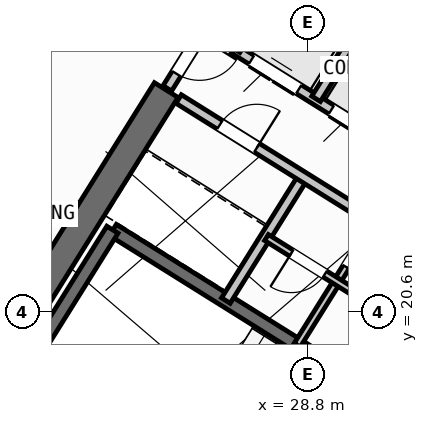
"""IFC4 building model, lengths in metres.
Left out: names, types, materials, properties, quantities, classifications, styles, units other than length and angle.
Written with IfcOpenShell. Run it as: python <this file> out.ifc"""

import sys

from ifc_helpers import new_model, si_unit, direction, frame, frame_2d, origin, place, context, subcontext, project, spatial, rectangle, extrude, source, transform, mapped, element, fill, save


model = new_model("IFC4")
c1 = context("Model", 3, precision=1e-05, world=origin(), true_north=direction((0.0, 1.0)))
c2 = subcontext(c1, "Body", "Model", "MODEL_VIEW")
j1 = project(units=[si_unit("LENGTHUNIT", "METRE"), si_unit("PLANEANGLEUNIT", "RADIAN")], contexts=[c1])
p1 = place(None, origin())
s1 = spatial("IfcSite", under=j1, at=p1, CompositionType="ELEMENT")
p2 = place(p1, origin())
s2 = spatial("IfcBuilding", under=s1, at=p2, CompositionType="ELEMENT")
p3 = place(p2, frame((0.0, 0.0, 132.6)))
s3 = spatial("IfcBuildingStorey", under=s2, at=p3, CompositionType="ELEMENT", Elevation=132.6)
p4 = place(p3, frame((40.573, 24.01, 0.0), z_axis=(0.0, 0.0, 1.0), x_axis=(-0.848047359947, 0.529920442413, 0.0)))
e1 = element("IfcWall", 1, at=p4, inside=s3, PredefinedType="SHEAR", context=c2, shape_type="SweptSolid", body=[
    extrude(rectangle(XDim=13.14, YDim=0.55, at=frame_2d((6.57, 0.0))), origin(), (0.0, 0.0, 1.0), 3.32),
])
p5 = place(p3, frame((26.007, 24.976, 0.0), z_axis=(0.0, 0.0, 1.0), x_axis=(-0.529923795287, -0.848045264823, 0.0)))
e2 = element("IfcWall", 2, at=p5, inside=s3, PredefinedType="SHEAR", context=c2, shape_type="SweptSolid", body=[
    extrude(rectangle(XDim=6.425, YDim=0.55, at=frame_2d((3.212, 0.0))), origin(), (0.0, 0.0, 1.0), 3.32),
])
p6 = place(p3, frame((29.268, 6.429, 0.0), z_axis=(0.0, 0.0, 1.0), x_axis=(-0.848049971435, 0.529916263149, 0.0)))
e3 = element("IfcWall", 3, at=p6, inside=s3, PredefinedType="STANDARD", context=c2, shape_type="SweptSolid", body=[
    extrude(rectangle(XDim=31.588, YDim=0.32, at=frame_2d((15.794, 0.0))), origin(), (0.0, 0.0, 1.0), 3.32),
])
p7 = place(p6, frame((16.362, 0.0, 0.0)))
e4 = element("IfcOpeningElement", 4, at=p7, cuts=e3, PredefinedType="OPENING", context=c2, shape_type="SweptSolid", body=[
    extrude(rectangle(XDim=1.2, YDim=2.15, at=frame_2d((0.6, 1.075))), frame((0.0, 0.17, 0.0), z_axis=(0.0, -1.0, 0.0), x_axis=(1.0, 0.0, 0.0)), (0.0, 0.0, 1.0), 0.34),
])
p8 = place(p6, frame((2.989, 0.0, 0.8)))
e5 = element("IfcOpeningElement", 5, at=p8, cuts=e3, PredefinedType="OPENING", context=c2, shape_type="SweptSolid", body=[
    extrude(rectangle(XDim=2.1, YDim=1.55, at=frame_2d((1.05, 0.775))), frame((0.0, 0.17, 0.0), z_axis=(0.0, -1.0, 0.0), x_axis=(1.0, 0.0, 0.0)), (0.0, 0.0, 1.0), 0.34),
])
p9 = place(p6, frame((8.359, 0.0, 0.8)))
e6 = element("IfcOpeningElement", 6, at=p9, cuts=e3, PredefinedType="OPENING", context=c2, shape_type="SweptSolid", body=[
    extrude(rectangle(XDim=2.1, YDim=1.55, at=frame_2d((1.05, 0.775))), frame((0.0, 0.17, 0.0), z_axis=(0.0, -1.0, 0.0), x_axis=(1.0, 0.0, 0.0)), (0.0, 0.0, 1.0), 0.34),
])
p10 = place(p6, frame((13.284, 0.0, 0.95)))
e7 = element("IfcOpeningElement", 7, at=p10, cuts=e3, PredefinedType="OPENING", context=c2, shape_type="SweptSolid", body=[
    extrude(rectangle(XDim=1.2, YDim=1.4, at=frame_2d((0.6, 0.7))), frame((0.0, 0.17, 0.0), z_axis=(0.0, -1.0, 0.0), x_axis=(1.0, 0.0, 0.0)), (0.0, 0.0, 1.0), 0.34),
])
p11 = place(p6, frame((20.39, 0.0, 0.95)))
e8 = element("IfcOpeningElement", 8, at=p11, cuts=e3, PredefinedType="OPENING", context=c2, shape_type="SweptSolid", body=[
    extrude(rectangle(XDim=1.2, YDim=1.4, at=frame_2d((0.6, 0.7))), frame((0.0, 0.17, 0.0), z_axis=(0.0, -1.0, 0.0), x_axis=(1.0, 0.0, 0.0)), (0.0, 0.0, 1.0), 0.34),
])
p12 = place(p6, frame((23.715, 0.0, 1.0)))
e9 = element("IfcOpeningElement", 9, at=p12, cuts=e3, PredefinedType="OPENING", context=c2, shape_type="SweptSolid", body=[
    extrude(rectangle(XDim=0.9, YDim=1.25, at=frame_2d((0.45, 0.625))), frame((0.0, 0.17, 0.0), z_axis=(0.0, -1.0, 0.0), x_axis=(1.0, 0.0, 0.0)), (0.0, 0.0, 1.0), 0.34),
])
p13 = place(p6, frame((27.481, 0.0, 0.8)))
e10 = element("IfcOpeningElement", 10, at=p13, cuts=e3, PredefinedType="OPENING", context=c2, shape_type="SweptSolid", body=[
    extrude(rectangle(XDim=2.1, YDim=1.55, at=frame_2d((1.05, 0.775))), frame((0.0, 0.17, 0.0), z_axis=(0.0, -1.0, 0.0), x_axis=(1.0, 0.0, 0.0)), (0.0, 0.0, 1.0), 0.34),
])
p14 = place(p3, frame((14.138, 41.825, 0.0), z_axis=(0.0, 0.0, 1.0), x_axis=(0.848046498049, -0.529921821731, 0.0)))
e11 = element("IfcWall", 11, at=p14, inside=s3, PredefinedType="STANDARD", context=c2, shape_type="SweptSolid", body=[
    extrude(rectangle(XDim=31.588, YDim=0.32, at=frame_2d((15.794, 0.0))), origin(), (0.0, 0.0, 1.0), 3.32),
])
p15 = place(p14, frame((3.253, 0.0, 0.0)))
e12 = element("IfcOpeningElement", 12, at=p15, cuts=e11, PredefinedType="OPENING", context=c2, shape_type="SweptSolid", body=[
    extrude(rectangle(XDim=1.05, YDim=2.15, at=frame_2d((0.525, 1.075))), frame((0.0, 0.17, 0.0), z_axis=(0.0, -1.0, 0.0), x_axis=(1.0, 0.0, 0.0)), (0.0, 0.0, 1.0), 0.34),
])
p16 = place(p14, frame((0.863, 0.0, 0.85)))
e13 = element("IfcOpeningElement", 13, at=p16, cuts=e11, PredefinedType="OPENING", context=c2, shape_type="SweptSolid", body=[
    extrude(rectangle(XDim=1.8, YDim=1.5, at=frame_2d((0.9, 0.75))), frame((0.0, 0.17, 0.0), z_axis=(0.0, -1.0, 0.0), x_axis=(1.0, 0.0, 0.0)), (0.0, 0.0, 1.0), 0.34),
])
p17 = place(p14, frame((8.435, 0.0, 0.85)))
e14 = element("IfcOpeningElement", 14, at=p17, cuts=e11, PredefinedType="OPENING", context=c2, shape_type="SweptSolid", body=[
    extrude(rectangle(XDim=1.8, YDim=1.5, at=frame_2d((0.9, 0.75))), frame((0.0, 0.17, 0.0), z_axis=(0.0, -1.0, 0.0), x_axis=(1.0, 0.0, 0.0)), (0.0, 0.0, 1.0), 0.34),
])
p18 = place(p14, frame((13.874, 0.0, 0.85)))
e15 = element("IfcOpeningElement", 15, at=p18, cuts=e11, PredefinedType="OPENING", context=c2, shape_type="SweptSolid", body=[
    extrude(rectangle(XDim=1.5, YDim=1.5, at=frame_2d((0.75, 0.75))), frame((0.0, 0.17, 0.0), z_axis=(0.0, -1.0, 0.0), x_axis=(1.0, 0.0, 0.0)), (0.0, 0.0, 1.0), 0.34),
])
p19 = place(p14, frame((17.104, 0.0, 1.0)))
e16 = element("IfcOpeningElement", 16, at=p19, cuts=e11, PredefinedType="OPENING", context=c2, shape_type="SweptSolid", body=[
    extrude(rectangle(XDim=0.9, YDim=1.25, at=frame_2d((0.45, 0.625))), frame((0.0, 0.17, 0.0), z_axis=(0.0, -1.0, 0.0), x_axis=(1.0, 0.0, 0.0)), (0.0, 0.0, 1.0), 0.34),
])
p20 = place(p14, frame((22.131, 0.0, 1.0)))
e17 = element("IfcOpeningElement", 17, at=p20, cuts=e11, PredefinedType="OPENING", context=c2, shape_type="SweptSolid", body=[
    extrude(rectangle(XDim=0.9, YDim=1.25, at=frame_2d((0.45, 0.625))), frame((0.0, 0.17, 0.0), z_axis=(0.0, -1.0, 0.0), x_axis=(1.0, 0.0, 0.0)), (0.0, 0.0, 1.0), 0.34),
])
p21 = place(p14, frame((27.706, 0.0, 1.0)))
e18 = element("IfcOpeningElement", 18, at=p21, cuts=e11, PredefinedType="OPENING", context=c2, shape_type="SweptSolid", body=[
    extrude(rectangle(XDim=0.9, YDim=1.25, at=frame_2d((0.45, 0.625))), frame((0.0, 0.17, 0.0), z_axis=(0.0, -1.0, 0.0), x_axis=(1.0, 0.0, 0.0)), (0.0, 0.0, 1.0), 0.34),
])
p22 = place(p3, frame((31.28, 18.261, 0.0), z_axis=(0.0, 0.0, 1.0), x_axis=(-0.848051618787, 0.529913626805, 0.0)))
e19 = element("IfcWall", 19, at=p22, inside=s3, PredefinedType="SHEAR", context=c2, shape_type="SweptSolid", body=[
    extrude(rectangle(XDim=7.46, YDim=0.26, at=frame_2d((3.73, 0.0))), origin(), (0.0, 0.0, 1.0), 3.32),
])
p23 = place(p22, frame((0.36, 0.0, 0.0)))
e20 = element("IfcOpeningElement", 20, at=p23, cuts=e19, PredefinedType="OPENING", context=c2, shape_type="SweptSolid", body=[
    extrude(rectangle(XDim=0.86, YDim=2.05, at=frame_2d((0.43, 1.025))), frame((0.0, 0.14, 0.0), z_axis=(0.0, -1.0, 0.0), x_axis=(1.0, 0.0, 0.0)), (0.0, 0.0, 1.0), 0.28),
])
p24 = place(p3, frame((24.945, 22.22, 0.0), z_axis=(0.0, 0.0, 1.0), x_axis=(-0.529908658664, -0.84805472316, 0.0)))
e21 = element("IfcWall", 21, at=p24, inside=s3, PredefinedType="SHEAR", context=c2, shape_type="SweptSolid", body=[
    extrude(rectangle(XDim=3.16, YDim=0.26, at=frame_2d((1.58, 0.0))), origin(), (0.0, 0.0, 1.0), 3.32),
])
p25 = place(p3, frame((31.822, 24.998, 0.0), z_axis=(0.0, 0.0, 1.0), x_axis=(-0.848036912365, 0.52993716162, 0.0)))
e22 = element("IfcWall", 22, at=p25, inside=s3, PredefinedType="STANDARD", context=c2, shape_type="SweptSolid", body=[
    extrude(rectangle(XDim=4.618, YDim=0.2, at=frame_2d((2.309, 0.0))), origin(), (0.0, 0.0, 1.0), 3.31),
])
p26 = place(p3, frame((32.108, 22.814, 0.0), z_axis=(0.0, 0.0, 1.0), x_axis=(-0.848042229521, 0.529928652696, 0.0)))
e23 = element("IfcWall", 23, at=p26, inside=s3, PredefinedType="STANDARD", context=c2, shape_type="SweptSolid", body=[
    extrude(rectangle(XDim=5.62, YDim=0.2, at=frame_2d((2.81, 0.0))), origin(), (0.0, 0.0, 1.0), 3.31),
])
p27 = place(p26, frame((0.39, 0.0, 0.0)))
e24 = element("IfcOpeningElement", 24, at=p27, cuts=e23, PredefinedType="OPENING", context=c2, shape_type="SweptSolid", body=[
    extrude(rectangle(XDim=1.1, YDim=2.15, at=frame_2d((0.55, 1.075))), frame((0.0, 0.11, 0.0), z_axis=(0.0, -1.0, 0.0), x_axis=(1.0, 0.0, 0.0)), (0.0, 0.0, 1.0), 0.22),
])
p28 = place(p26, frame((2.25, 0.0, 0.0)))
e25 = element("IfcOpeningElement", 25, at=p28, cuts=e23, PredefinedType="OPENING", context=c2, shape_type="SweptSolid", body=[
    extrude(rectangle(XDim=1.1, YDim=2.15, at=frame_2d((0.55, 1.075))), frame((0.0, 0.11, 0.0), z_axis=(0.0, -1.0, 0.0), x_axis=(1.0, 0.0, 0.0)), (0.0, 0.0, 1.0), 0.22),
])
p29 = place(p26, frame((4.11, 0.0, 0.0)))
e26 = element("IfcOpeningElement", 26, at=p29, cuts=e23, PredefinedType="OPENING", context=c2, shape_type="SweptSolid", body=[
    extrude(rectangle(XDim=1.1, YDim=2.15, at=frame_2d((0.55, 1.075))), frame((0.0, 0.11, 0.0), z_axis=(0.0, -1.0, 0.0), x_axis=(1.0, 0.0, 0.0)), (0.0, 0.0, 1.0), 0.22),
])
p30 = place(p3, frame((28.25, 27.17, 0.0), z_axis=(0.0, 0.0, 1.0), x_axis=(-0.529905827651, -0.848056492117, 0.0)))
e27 = element("IfcWall", 27, at=p30, inside=s3, PredefinedType="STANDARD", context=c2, shape_type="SweptSolid", body=[
    extrude(rectangle(XDim=1.65, YDim=0.2, at=frame_2d((0.825, 0.0))), origin(), (0.0, 0.0, 1.0), 3.31),
])
p31 = place(p3, frame((29.801, 26.142, 0.0), z_axis=(0.0, 0.0, 1.0), x_axis=(-0.529998940003, -0.847998304005, 0.0)))
e28 = element("IfcWall", 28, at=p31, inside=s3, PredefinedType="STANDARD", context=c2, shape_type="SweptSolid", body=[
    extrude(rectangle(XDim=1.58, YDim=0.2, at=frame_2d((0.79, 0.0))), origin(), (0.0, 0.0, 1.0), 3.31),
])
p32 = place(p3, frame((28.71, 23.263, 0.0), z_axis=(0.0, 0.0, 1.0), x_axis=(-0.529907497854, -0.848055448493, 0.0)))
e29 = element("IfcWall", 29, at=p32, inside=s3, PredefinedType="STANDARD", context=c2, shape_type="SweptSolid", body=[
    extrude(rectangle(XDim=2.88, YDim=0.2, at=frame_2d((1.44, 0.0))), origin(), (0.0, 0.0, 1.0), 3.31),
])
p33 = place(p3, frame((31.525, 21.504, 0.0), z_axis=(0.0, 0.0, 1.0), x_axis=(-0.848040211232, 0.529931882541, 0.0)))
e30 = element("IfcWall", 30, at=p33, inside=s3, PredefinedType="STANDARD", context=c2, shape_type="SweptSolid", body=[
    extrude(rectangle(XDim=6.218, YDim=0.2, at=frame_2d((3.109, 0.0))), origin(), (0.0, 0.0, 1.0), 3.31),
])
p34 = place(p33, frame((4.4, 0.0, 0.0)))
e31 = element("IfcOpeningElement", 31, at=p34, cuts=e30, PredefinedType="OPENING", context=c2, shape_type="SweptSolid", body=[
    extrude(rectangle(XDim=0.86, YDim=2.05, at=frame_2d((0.43, 1.025))), frame((0.0, 0.11, 0.0), z_axis=(0.0, -1.0, 0.0), x_axis=(1.0, 0.0, 0.0)), (0.0, 0.0, 1.0), 0.22),
])
p35 = place(p33, frame((0.35, 0.0, 0.0)))
e32 = element("IfcOpeningElement", 32, at=p35, cuts=e30, PredefinedType="OPENING", context=c2, shape_type="SweptSolid", body=[
    extrude(rectangle(XDim=0.86, YDim=2.05, at=frame_2d((0.43, 1.025))), frame((0.0, 0.11, 0.0), z_axis=(0.0, -1.0, 0.0), x_axis=(1.0, 0.0, 0.0)), (0.0, 0.0, 1.0), 0.22),
])
p36 = place(p3, frame((30.117, 22.384, 0.0), z_axis=(0.0, 0.0, 1.0), x_axis=(-0.529951914384, -0.848027693204, 0.0)))
e33 = element("IfcWall", 33, at=p36, inside=s3, PredefinedType="PLUMBINGWALL", context=c2, shape_type="SweptSolid", body=[
    extrude(rectangle(XDim=1.4, YDim=0.14, at=frame_2d((0.7, 0.0))), origin(), (0.0, 0.0, 1.0), 3.31),
])
p37 = place(p36, frame((0.28, 0.0, 0.0)))
e34 = element("IfcOpeningElement", 34, at=p37, cuts=e33, PredefinedType="OPENING", context=c2, shape_type="SweptSolid", body=[
    extrude(rectangle(XDim=0.78, YDim=2.05, at=frame_2d((0.39, 1.025))), frame((0.0, 0.08, 0.0), z_axis=(0.0, -1.0, 0.0), x_axis=(1.0, 0.0, 0.0)), (0.0, 0.0, 1.0), 0.16),
])
p38 = place(p3, frame((29.375, 21.196, 0.0), z_axis=(0.0, 0.0, 1.0), x_axis=(-0.529865479138, -0.848081702443, 0.0)))
e35 = element("IfcWall", 35, at=p38, inside=s3, PredefinedType="PLUMBINGWALL", context=c2, shape_type="SweptSolid", body=[
    extrude(rectangle(XDim=1.48, YDim=0.14, at=frame_2d((0.74, 0.0))), origin(), (0.0, 0.0, 1.0), 3.31),
])
p39 = place(p3, frame((30.766, 20.327, 0.0), z_axis=(0.0, 0.0, 1.0), x_axis=(-0.848052663127, 0.529911955482, 0.0)))
e36 = element("IfcWall", 36, at=p39, inside=s3, PredefinedType="PLUMBINGWALL", context=c2, shape_type="SweptSolid", body=[
    extrude(rectangle(XDim=3.28, YDim=0.14, at=frame_2d((1.64, 0.0))), origin(), (0.0, 0.0, 1.0), 3.31),
])
p40 = place(p39, frame((0.25, 0.0, 0.0)))
e37 = element("IfcOpeningElement", 37, at=p40, cuts=e36, PredefinedType="OPENING", context=c2, shape_type="SweptSolid", body=[
    extrude(rectangle(XDim=0.78, YDim=2.05, at=frame_2d((0.39, 1.025))), frame((0.0, 0.08, 0.0), z_axis=(0.0, -1.0, 0.0), x_axis=(1.0, 0.0, 0.0)), (0.0, 0.0, 1.0), 0.16),
])
p41 = place(p39, frame((1.92, 0.0, 0.0)))
e38 = element("IfcOpeningElement", 38, at=p41, cuts=e36, PredefinedType="OPENING", context=c2, shape_type="SweptSolid", body=[
    extrude(rectangle(XDim=0.78, YDim=2.05, at=frame_2d((0.39, 1.025))), frame((0.0, 0.08, 0.0), z_axis=(0.0, -1.0, 0.0), x_axis=(1.0, 0.0, 0.0)), (0.0, 0.0, 1.0), 0.16),
])
p42 = place(p3, frame((27.596, 27.52, 0.0), z_axis=(0.0, 0.0, 1.0), x_axis=(-0.529865479138, -0.848081702443, 0.0)))
e39 = element("IfcWall", 39, at=p42, inside=s3, PredefinedType="STANDARD", context=c2, shape_type="SweptSolid", body=[
    extrude(rectangle(XDim=2.96, YDim=0.2, at=frame_2d((1.48, 0.0))), origin(), (0.0, 0.0, 1.0), 3.31),
])
p43 = place(p42, frame((1.76, 0.0, 0.0)))
e40 = element("IfcOpeningElement", 40, at=p43, cuts=e39, PredefinedType="OPENING", context=c2, shape_type="SweptSolid", body=[
    extrude(rectangle(XDim=0.86, YDim=2.05, at=frame_2d((0.43, 1.025))), frame((0.0, 0.11, 0.0), z_axis=(0.0, -1.0, 0.0), x_axis=(1.0, 0.0, 0.0)), (0.0, 0.0, 1.0), 0.22),
])
p44 = place(p3, frame((24.588, 27.631, 0.0), z_axis=(0.0, 0.0, 1.0), x_axis=(-0.529914586043, -0.848051019396, 0.0)))
e41 = element("IfcWall", 41, at=p44, inside=s3, PredefinedType="PARTITIONING", context=c2, shape_type="SweptSolid", body=[
    extrude(rectangle(XDim=15.35, YDim=0.16, at=frame_2d((7.675, 0.0))), origin(), (0.0, 0.0, 1.0), 3.31),
])
m1 = source(origin(), c2, "Body", "SweptSolid", [
    extrude(rectangle(XDim=1.1, YDim=2.15, at=frame_2d((0.55, 1.075))), frame((0.0, 0.025, 0.0), z_axis=(0.0, -1.0, 0.0), x_axis=(1.0, 0.0, 0.0)), (0.0, 0.0, 1.0), 0.05),
])
p45 = place(p28, origin())
e42 = element("IfcDoor", 42, at=p45, inside=s3, OperationType="DOUBLE_DOOR_SLIDING", PredefinedType="DOOR", context=c2, shape_type="MappedRepresentation", body=[
    mapped(m1, transform((0.0, 0.0, 0.0), scale=1.0)),
])
fill(e25, e42)
p46 = place(p29, origin())
e43 = element("IfcDoor", 43, at=p46, inside=s3, OperationType="DOUBLE_DOOR_SLIDING", PredefinedType="DOOR", context=c2, shape_type="MappedRepresentation", body=[
    mapped(m1, transform((0.0, 0.0, 0.0), scale=1.0)),
])
fill(e26, e43)
m2 = source(origin(), c2, "Body", "SweptSolid", [
    extrude(rectangle(XDim=0.86, YDim=2.05, at=frame_2d((0.43, 1.025))), frame((0.0, 0.025, 0.0), z_axis=(0.0, -1.0, 0.0), x_axis=(1.0, 0.0, 0.0)), (0.0, 0.0, 1.0), 0.05),
])
p47 = place(p34, frame((0.86, 0.0, 0.0), z_axis=(0.0, 0.0, 1.0), x_axis=(-1.0, 0.0, 0.0)))
e44 = element("IfcDoor", 44, at=p47, inside=s3, OperationType="SINGLE_SWING_RIGHT", PredefinedType="DOOR", context=c2, shape_type="MappedRepresentation", body=[
    mapped(m2, transform((0.0, 0.0, 0.0), scale=1.0)),
])
fill(e31, e44)
m3 = source(origin(), c2, "Body", "SweptSolid", [
    extrude(rectangle(XDim=0.78, YDim=2.05, at=frame_2d((0.39, 1.025))), frame((0.0, 0.025, 0.0), z_axis=(0.0, -1.0, 0.0), x_axis=(1.0, 0.0, 0.0)), (0.0, 0.0, 1.0), 0.05),
])
p48 = place(p37, origin())
e45 = element("IfcDoor", 45, at=p48, inside=s3, OperationType="SINGLE_SWING_RIGHT", PredefinedType="DOOR", context=c2, shape_type="MappedRepresentation", body=[
    mapped(m3, transform((0.0, 0.0, 0.0), scale=1.0)),
])
fill(e34, e45)
p49 = place(p41, origin())
e46 = element("IfcDoor", 46, at=p49, inside=s3, OperationType="SINGLE_SWING_RIGHT", PredefinedType="DOOR", context=c2, shape_type="MappedRepresentation", body=[
    mapped(m3, transform((0.0, 0.0, 0.0), scale=1.0)),
])
fill(e38, e46)
p50 = place(p43, origin())
e47 = element("IfcDoor", 47, at=p50, inside=s3, OperationType="SINGLE_SWING_LEFT", PredefinedType="DOOR", context=c2, shape_type="MappedRepresentation", body=[
    mapped(m2, transform((0.0, 0.0, 0.0), scale=1.0)),
])
fill(e40, e47)
save(model, sys.argv[1])
